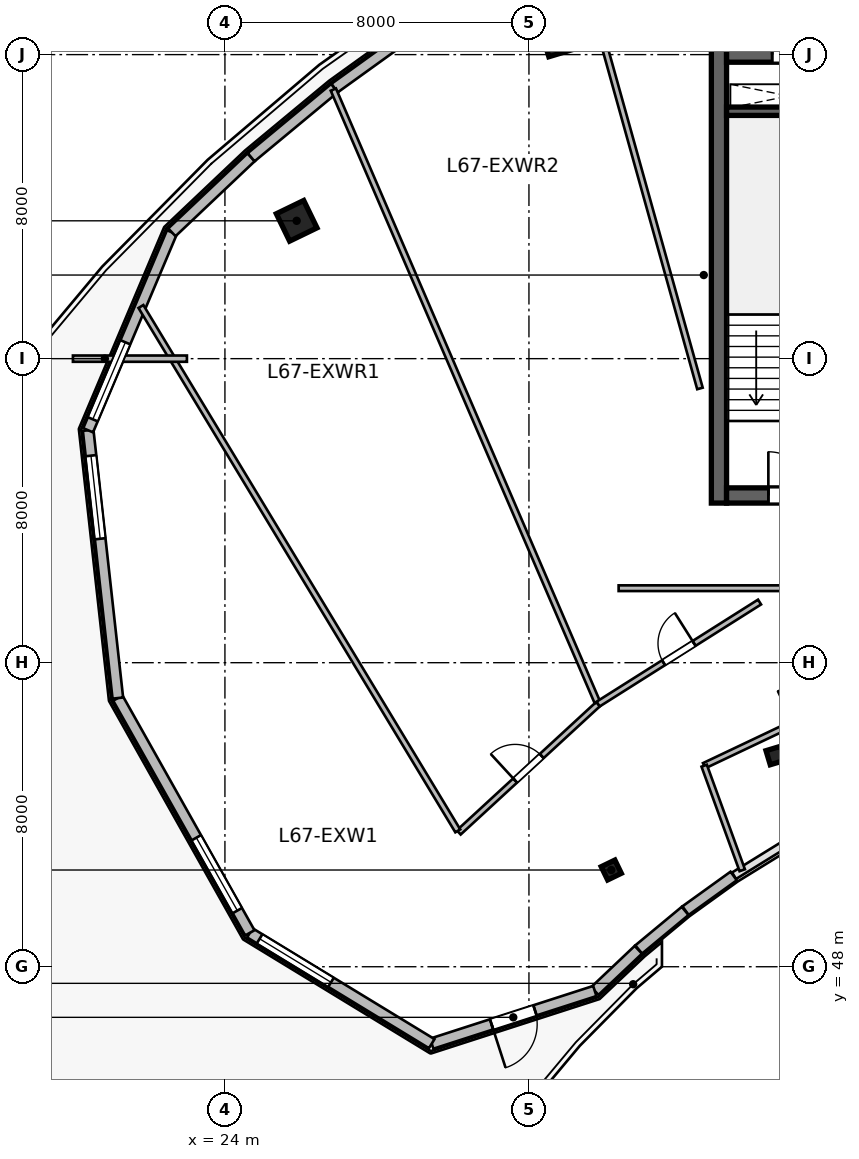
"""IFC4 building model, lengths in metres.
Left out: names, types, materials, properties, quantities, classifications, styles, units other than length and angle.
Written with IfcOpenShell. Run it as: python <this file> out.ifc"""

import sys

from ifc_helpers import new_model, si_unit, direction, frame, frame_2d, origin, origin_2d, place, context, subcontext, project, spatial, rectangle, i_section, extrude, source, transform, mapped, element, fill, save


model = new_model("IFC4")
c1 = context("Model", 3, precision=1e-05, world=origin(), true_north=direction((0.0, 1.0)))
c2 = subcontext(c1, "Body", "Model", "MODEL_VIEW")
j1 = project(units=[si_unit("LENGTHUNIT", "METRE"), si_unit("PLANEANGLEUNIT", "RADIAN")], contexts=[c1])
p1 = place(None, origin())
s1 = spatial("IfcSite", under=j1, at=p1, CompositionType="ELEMENT")
p2 = place(p1, origin())
s2 = spatial("IfcBuilding", under=s1, at=p2, CompositionType="ELEMENT")
p3 = place(p2, frame((0.0, 0.0, 275.7)))
s3 = spatial("IfcBuildingStorey", under=s2, at=p3, CompositionType="ELEMENT", Elevation=275.7)
m1 = source(origin(), c2, "Body", "SweptSolid", [
    extrude(rectangle(XDim=12.0, YDim=0.4, at=frame_2d((6.0, 0.0))), origin(), (0.0, 0.0, 1.0), 3.9),
])
p4 = place(p3, frame((37.0, 60.2, 0.0), z_axis=(0.0, 0.0, 1.0), x_axis=(0.0, 1.0, 0.0)))
e1 = element("IfcWall", 1, at=p4, inside=s3, PredefinedType="SHEAR", context=c2, shape_type="MappedRepresentation", body=[
    mapped(m1, transform((0.0, 0.0, 0.0), scale=1.0)),
])
m2 = source(origin(), c2, "Body", "SweptSolid", [
    extrude(rectangle(XDim=21.6, YDim=0.4, at=frame_2d((10.8, 0.0))), origin(), (0.0, 0.0, 1.0), 3.9),
])
p5 = place(p3, frame((37.2, 60.4, 0.0), z_axis=(0.0, 0.0, 1.0), x_axis=(1.0, 0.0, 0.0)))
e2 = element("IfcWall", 2, at=p5, inside=s3, PredefinedType="SHEAR", context=c2, shape_type="MappedRepresentation", body=[
    mapped(m2, transform((0.0, 0.0, 0.0), scale=1.0)),
])
p6 = place(p5, frame((1.1, 0.0, 0.0)))
e3 = element("IfcOpeningElement", 3, at=p6, cuts=e2, PredefinedType="OPENING", context=c2, shape_type="SweptSolid", body=[
    extrude(rectangle(XDim=1.15, YDim=2.15, at=frame_2d((0.575, 1.075))), frame((0.0, 0.21, 0.0), z_axis=(0.0, -1.0, 0.0), x_axis=(1.0, 0.0, 0.0)), (0.0, 0.0, 1.0), 0.42),
])
p7 = place(p5, frame((19.5, 0.0, 0.0)))
e4 = element("IfcOpeningElement", 4, at=p7, cuts=e2, PredefinedType="OPENING", context=c2, shape_type="SweptSolid", body=[
    extrude(rectangle(XDim=0.9, YDim=2.1, at=frame_2d((0.45, 1.05))), frame((0.0, 0.21, 0.0), z_axis=(0.0, -1.0, 0.0), x_axis=(1.0, 0.0, 0.0)), (0.0, 0.0, 1.0), 0.42),
])
p8 = place(p5, frame((12.02, 0.0, 0.0)))
e5 = element("IfcOpeningElement", 5, at=p8, cuts=e2, PredefinedType="OPENING", context=c2, shape_type="SweptSolid", body=[
    extrude(rectangle(XDim=1.6, YDim=2.15, at=frame_2d((0.8, 1.075))), frame((0.0, 0.21, 0.0), z_axis=(0.0, -1.0, 0.0), x_axis=(1.0, 0.0, 0.0)), (0.0, 0.0, 1.0), 0.42),
])
p9 = place(p3, frame((37.2, 72.0, 0.0), z_axis=(0.0, 0.0, 1.0), x_axis=(1.0, 0.0, 0.0)))
e6 = element("IfcWall", 6, at=p9, inside=s3, PredefinedType="SHEAR", context=c2, shape_type="MappedRepresentation", body=[
    mapped(m2, transform((0.0, 0.0, 0.0), scale=1.0)),
])
p10 = place(p9, frame((1.2, 0.0, 0.0)))
e7 = element("IfcOpeningElement", 7, at=p10, cuts=e6, PredefinedType="OPENING", context=c2, shape_type="SweptSolid", body=[
    extrude(rectangle(XDim=0.9, YDim=2.1, at=frame_2d((0.45, 1.05))), frame((0.0, 0.21, 0.0), z_axis=(0.0, -1.0, 0.0), x_axis=(1.0, 0.0, 0.0)), (0.0, 0.0, 1.0), 0.42),
])
p11 = place(p9, frame((14.7, 0.0, 0.0)))
e8 = element("IfcOpeningElement", 8, at=p11, cuts=e6, PredefinedType="OPENING", context=c2, shape_type="SweptSolid", body=[
    extrude(rectangle(XDim=1.2, YDim=2.15, at=frame_2d((0.6, 1.075))), frame((0.0, 0.21, 0.0), z_axis=(0.0, -1.0, 0.0), x_axis=(1.0, 0.0, 0.0)), (0.0, 0.0, 1.0), 0.42),
])
p12 = place(p9, frame((4.15, 0.0, 0.0)))
e9 = element("IfcOpeningElement", 9, at=p12, cuts=e6, PredefinedType="OPENING", context=c2, shape_type="SweptSolid", body=[
    extrude(rectangle(XDim=1.3, YDim=2.15, at=frame_2d((0.65, 1.075))), frame((0.0, 0.21, 0.0), z_axis=(0.0, -1.0, 0.0), x_axis=(1.0, 0.0, 0.0)), (0.0, 0.0, 1.0), 0.42),
])
p13 = place(p9, frame((6.76, 0.0, 0.0)))
e10 = element("IfcOpeningElement", 10, at=p13, cuts=e6, PredefinedType="OPENING", context=c2, shape_type="SweptSolid", body=[
    extrude(rectangle(XDim=0.85, YDim=2.1, at=frame_2d((0.425, 1.05))), frame((0.0, 0.21, 0.0), z_axis=(0.0, -1.0, 0.0), x_axis=(1.0, 0.0, 0.0)), (0.0, 0.0, 1.0), 0.42),
])
p14 = place(p9, frame((8.76, 0.0, 0.0)))
e11 = element("IfcOpeningElement", 11, at=p14, cuts=e6, PredefinedType="OPENING", context=c2, shape_type="SweptSolid", body=[
    extrude(rectangle(XDim=0.85, YDim=2.1, at=frame_2d((0.425, 1.05))), frame((0.0, 0.21, 0.0), z_axis=(0.0, -1.0, 0.0), x_axis=(1.0, 0.0, 0.0)), (0.0, 0.0, 1.0), 0.42),
])
p15 = place(p9, frame((10.725, 0.0, 0.0)))
e12 = element("IfcOpeningElement", 12, at=p15, cuts=e6, PredefinedType="OPENING", context=c2, shape_type="SweptSolid", body=[
    extrude(rectangle(XDim=0.85, YDim=2.1, at=frame_2d((0.425, 1.05))), frame((0.0, 0.21, 0.0), z_axis=(0.0, -1.0, 0.0), x_axis=(1.0, 0.0, 0.0)), (0.0, 0.0, 1.0), 0.42),
])
m3 = source(origin(), c2, "Body", "SweptSolid", [
    extrude(rectangle(XDim=3.27, YDim=0.22, at=frame_2d((1.635, 0.0))), origin(), (0.0, 0.0, 1.0), 3.9),
])
p16 = place(p3, frame((37.2, 70.51, 0.0), z_axis=(0.0, 0.0, 1.0), x_axis=(1.0, 0.0, 0.0)))
e13 = element("IfcWall", 13, at=p16, inside=s3, PredefinedType="SHEAR", context=c2, shape_type="MappedRepresentation", body=[
    mapped(m3, transform((0.0, 0.0, 0.0), scale=1.0)),
])
m4 = source(origin(), c2, "Body", "SweptSolid", [
    extrude(i_section(OverallWidth=0.399, OverallDepth=0.387, WebThickness=0.021, FlangeThickness=0.033, at=origin_2d()), origin(), (0.0, 0.0, 1.0), 3.9),
])
p17 = place(p3, frame((34.166, 50.545, 0.0), z_axis=(0.0, 0.0, 1.0), x_axis=(-0.436173672171, 0.899862504889, 0.0)))
e14 = element("IfcColumn", 14, at=p17, inside=s3, PredefinedType="COLUMN", context=c2, shape_type="MappedRepresentation", body=[
    mapped(m4, transform((0.0, 0.0, 0.0), scale=1.0)),
])
m5 = source(origin(), c2, "Body", "SweptSolid", [
    extrude(rectangle(XDim=0.8, YDim=0.8, at=origin_2d()), origin(), (0.0, 0.0, 1.0), 3.9),
])
p18 = place(p3, frame((25.888, 67.627, 0.0), z_axis=(0.0, 0.0, 1.0), x_axis=(-0.436173672171, 0.899862504889, 0.0)))
e15 = element("IfcColumn", 15, at=p18, inside=s3, PredefinedType="COLUMN", context=c2, shape_type="MappedRepresentation", body=[
    mapped(m5, transform((0.0, 0.0, 0.0), scale=1.0)),
])
p19 = place(p3, frame((38.485, 53.558, 0.0), z_axis=(0.0, 0.0, 1.0), x_axis=(-0.288697611798, 0.957420330337, 0.0)))
e16 = element("IfcColumn", 16, at=p19, inside=s3, PredefinedType="COLUMN", context=c2, shape_type="MappedRepresentation", body=[
    mapped(m4, transform((0.0, 0.0, 0.0), scale=1.0)),
])
p20 = place(p3, frame((32.791, 72.442, 0.0), z_axis=(0.0, 0.0, 1.0), x_axis=(-0.288697611798, 0.957420330337, 0.0)))
e17 = element("IfcColumn", 17, at=p20, inside=s3, PredefinedType="COLUMN", context=c2, shape_type="MappedRepresentation", body=[
    mapped(m5, transform((0.0, 0.0, 0.0), scale=1.0)),
])
m6 = source(origin(), c2, "Body", "SweptSolid", [
    extrude(rectangle(XDim=1.561, YDim=0.28, at=frame_2d((0.781, 0.0))), origin(), (0.0, 0.0, 1.0), 3.64),
])
p21 = place(p3, frame((37.387, 50.387, 0.0), z_axis=(0.0, 0.0, 1.0), x_axis=(-0.81154027425, -0.584296485758, 0.0)))
e18 = element("IfcWall", 18, at=p21, inside=s3, PredefinedType="SOLIDWALL", context=c2, shape_type="MappedRepresentation", body=[
    mapped(m6, transform((0.0, 0.0, 0.0), scale=1.0)),
])
m7 = source(origin(), c2, "Body", "SweptSolid", [
    extrude(rectangle(XDim=1.589, YDim=0.28, at=frame_2d((0.794, 0.0))), origin(), (0.0, 0.0, 1.0), 3.64),
])
p22 = place(p3, frame((36.11, 49.468, 0.0), z_axis=(0.0, 0.0, 1.0), x_axis=(-0.769805836273, -0.63827813251, 0.0)))
e19 = element("IfcWall", 19, at=p22, inside=s3, PredefinedType="SOLIDWALL", context=c2, shape_type="MappedRepresentation", body=[
    mapped(m7, transform((0.0, 0.0, 0.0), scale=1.0)),
])
m8 = source(origin(), c2, "Body", "SweptSolid", [
    extrude(rectangle(XDim=1.577, YDim=0.28, at=frame_2d((0.789, 0.0))), origin(), (0.0, 0.0, 1.0), 3.64),
])
p23 = place(p3, frame((34.878, 48.446, 0.0), z_axis=(0.0, 0.0, 1.0), x_axis=(-0.726119464467, -0.687568558998, 0.0)))
e20 = element("IfcWall", 20, at=p23, inside=s3, PredefinedType="SOLIDWALL", context=c2, shape_type="MappedRepresentation", body=[
    mapped(m8, transform((0.0, 0.0, 0.0), scale=1.0)),
])
m9 = source(origin(), c2, "Body", "SweptSolid", [
    extrude(rectangle(XDim=4.509, YDim=0.28, at=frame_2d((2.255, 0.0))), origin(), (0.0, 0.0, 1.0), 3.64),
])
p24 = place(p3, frame((33.733, 47.361, 0.0), z_axis=(0.0, 0.0, 1.0), x_axis=(-0.95162949292, -0.307247958828, 0.0)))
e21 = element("IfcWall", 21, at=p24, inside=s3, PredefinedType="SOLIDWALL", context=c2, shape_type="MappedRepresentation", body=[
    mapped(m9, transform((0.0, 0.0, 0.0), scale=1.0)),
])
p25 = place(p24, frame((1.655, 0.0, 0.0)))
e22 = element("IfcOpeningElement", 22, at=p25, cuts=e21, PredefinedType="OPENING", context=c2, shape_type="SweptSolid", body=[
    extrude(rectangle(XDim=1.2, YDim=2.2, at=frame_2d((0.6, 1.1))), frame((0.0, 0.15, 0.0), z_axis=(0.0, -1.0, 0.0), x_axis=(1.0, 0.0, 0.0)), (0.0, 0.0, 1.0), 0.3),
])
m10 = source(origin(), c2, "Body", "SweptSolid", [
    extrude(rectangle(XDim=5.604, YDim=0.28, at=frame_2d((2.802, 0.0))), origin(), (0.0, 0.0, 1.0), 3.64),
])
p26 = place(p3, frame((29.442, 45.976, 0.0), z_axis=(0.0, 0.0, 1.0), x_axis=(-0.854002492971, 0.520268913158, 0.0)))
e23 = element("IfcWall", 23, at=p26, inside=s3, PredefinedType="SOLIDWALL", context=c2, shape_type="MappedRepresentation", body=[
    mapped(m10, transform((0.0, 0.0, 0.0), scale=1.0)),
])
p27 = place(p26, frame((3.103, 0.0, 0.95)))
e24 = element("IfcOpeningElement", 24, at=p27, cuts=e23, PredefinedType="OPENING", context=c2, shape_type="SweptSolid", body=[
    extrude(rectangle(XDim=2.2, YDim=2.1, at=frame_2d((1.1, 1.05))), frame((0.0, 0.15, 0.0), z_axis=(0.0, -1.0, 0.0), x_axis=(1.0, 0.0, 0.0)), (0.0, 0.0, 1.0), 0.3),
])
m11 = source(origin(), c2, "Body", "SweptSolid", [
    extrude(rectangle(XDim=7.087, YDim=0.28, at=frame_2d((3.543, 0.0))), origin(), (0.0, 0.0, 1.0), 3.64),
])
p28 = place(p3, frame((24.656, 48.892, 0.0), z_axis=(0.0, 0.0, 1.0), x_axis=(-0.490158199368, 0.871633489256, 0.0)))
e25 = element("IfcWall", 25, at=p28, inside=s3, PredefinedType="SOLIDWALL", context=c2, shape_type="MappedRepresentation", body=[
    mapped(m11, transform((0.0, 0.0, 0.0), scale=1.0)),
])
p29 = place(p28, frame((0.672, 0.0, 0.95)))
e26 = element("IfcOpeningElement", 26, at=p29, cuts=e25, PredefinedType="OPENING", context=c2, shape_type="SweptSolid", body=[
    extrude(rectangle(XDim=2.2, YDim=2.1, at=frame_2d((1.1, 1.05))), frame((0.0, 0.15, 0.0), z_axis=(0.0, -1.0, 0.0), x_axis=(1.0, 0.0, 0.0)), (0.0, 0.0, 1.0), 0.3),
])
m12 = source(origin(), c2, "Body", "SweptSolid", [
    extrude(rectangle(XDim=7.09, YDim=0.28, at=frame_2d((3.545, 0.0))), origin(), (0.0, 0.0, 1.0), 3.64),
])
p30 = place(p3, frame((21.182, 55.069, 0.0), z_axis=(0.0, 0.0, 1.0), x_axis=(-0.110159396922, 0.993913933532, 0.0)))
e27 = element("IfcWall", 27, at=p30, inside=s3, PredefinedType="SOLIDWALL", context=c2, shape_type="MappedRepresentation", body=[
    mapped(m12, transform((0.0, 0.0, 0.0), scale=1.0)),
])
p31 = place(p30, frame((4.217, 0.0, 0.95)))
e28 = element("IfcOpeningElement", 28, at=p31, cuts=e27, PredefinedType="OPENING", context=c2, shape_type="SweptSolid", body=[
    extrude(rectangle(XDim=2.2, YDim=2.1, at=frame_2d((1.1, 1.05))), frame((0.0, 0.15, 0.0), z_axis=(0.0, -1.0, 0.0), x_axis=(1.0, 0.0, 0.0)), (0.0, 0.0, 1.0), 0.3),
])
m13 = source(origin(), c2, "Body", "SweptSolid", [
    extrude(rectangle(XDim=5.655, YDim=0.28, at=frame_2d((2.828, 0.0))), origin(), (0.0, 0.0, 1.0), 3.64),
])
p32 = place(p3, frame((20.401, 62.116, 0.0), z_axis=(0.0, 0.0, 1.0), x_axis=(0.389585063528, 0.920990487614, 0.0)))
e29 = element("IfcWall", 29, at=p32, inside=s3, PredefinedType="SOLIDWALL", context=c2, shape_type="MappedRepresentation", body=[
    mapped(m13, transform((0.0, 0.0, 0.0), scale=1.0)),
])
p33 = place(p32, frame((0.314, 0.0, 0.95)))
e30 = element("IfcOpeningElement", 30, at=p33, cuts=e29, PredefinedType="OPENING", context=c2, shape_type="SweptSolid", body=[
    extrude(rectangle(XDim=2.2, YDim=2.1, at=frame_2d((1.1, 1.05))), frame((0.0, 0.15, 0.0), z_axis=(0.0, -1.0, 0.0), x_axis=(1.0, 0.0, 0.0)), (0.0, 0.0, 1.0), 0.3),
])
m14 = source(origin(), c2, "Body", "SweptSolid", [
    extrude(rectangle(XDim=2.873, YDim=0.28, at=frame_2d((1.436, 0.0))), origin(), (0.0, 0.0, 1.0), 3.64),
])
p34 = place(p3, frame((22.604, 67.324, 0.0), z_axis=(0.0, 0.0, 1.0), x_axis=(0.72609560544, 0.687593754888, 0.0)))
e31 = element("IfcWall", 31, at=p34, inside=s3, PredefinedType="SOLIDWALL", context=c2, shape_type="MappedRepresentation", body=[
    mapped(m14, transform((0.0, 0.0, 0.0), scale=1.0)),
])
m15 = source(origin(), c2, "Body", "SweptSolid", [
    extrude(rectangle(XDim=2.852, YDim=0.28, at=frame_2d((1.426, 0.0))), origin(), (0.0, 0.0, 1.0), 3.64),
])
p35 = place(p3, frame((24.69, 69.299, 0.0), z_axis=(0.0, 0.0, 1.0), x_axis=(0.769783606009, 0.638304942735, 0.0)))
e32 = element("IfcWall", 32, at=p35, inside=s3, PredefinedType="SOLIDWALL", context=c2, shape_type="MappedRepresentation", body=[
    mapped(m15, transform((0.0, 0.0, 0.0), scale=1.0)),
])
m16 = source(origin(), c2, "Body", "SweptSolid", [
    extrude(rectangle(XDim=2.802, YDim=0.28, at=frame_2d((1.401, 0.0))), origin(), (0.0, 0.0, 1.0), 3.64),
])
p36 = place(p3, frame((26.885, 71.12, 0.0), z_axis=(0.0, 0.0, 1.0), x_axis=(0.811507896482, 0.584341453217, 0.0)))
e33 = element("IfcWall", 33, at=p36, inside=s3, PredefinedType="SOLIDWALL", context=c2, shape_type="MappedRepresentation", body=[
    mapped(m16, transform((0.0, 0.0, 0.0), scale=1.0)),
])
m17 = source(origin(), c2, "Body", "SweptSolid", [
    extrude(rectangle(XDim=6.137, YDim=0.15, at=frame_2d((3.069, 0.0))), origin(), (0.0, 0.0, 1.0), 3.64),
])
p37 = place(p3, frame((36.611, 53.29, 0.0), z_axis=(0.0, 0.0, 1.0), x_axis=(0.903442784804, 0.428708682657, 0.0)))
e34 = element("IfcWall", 34, at=p37, inside=s3, PredefinedType="PARTITIONING", context=c2, shape_type="MappedRepresentation", body=[
    mapped(m17, transform((0.0, 0.0, 0.0), scale=1.0)),
])
p38 = place(p37, frame((2.594, 0.0, 0.0)))
e35 = element("IfcOpeningElement", 35, at=p38, cuts=e34, PredefinedType="OPENING", context=c2, shape_type="SweptSolid", body=[
    extrude(rectangle(XDim=0.95, YDim=2.1, at=frame_2d((0.475, 1.05))), frame((0.0, 0.085, 0.0), z_axis=(0.0, -1.0, 0.0), x_axis=(1.0, 0.0, 0.0)), (0.0, 0.0, 1.0), 0.17),
])
m18 = source(origin(), c2, "Body", "SweptSolid", [
    extrude(rectangle(XDim=2.927, YDim=0.15, at=frame_2d((1.464, 0.0))), origin(), (0.0, 0.0, 1.0), 3.64),
])
p39 = place(p3, frame((37.612, 50.539, 0.0), z_axis=(0.0, 0.0, 1.0), x_axis=(-0.342030996507, 0.93968867048, 0.0)))
e36 = element("IfcWall", 36, at=p39, inside=s3, PredefinedType="PARTITIONING", context=c2, shape_type="MappedRepresentation", body=[
    mapped(m18, transform((0.0, 0.0, 0.0), scale=1.0)),
])
m19 = source(origin(), c2, "Body", "SweptSolid", [
    extrude(rectangle(XDim=4.986, YDim=0.15, at=frame_2d((2.493, 0.0))), origin(), (0.0, 0.0, 1.0), 3.64),
])
p40 = place(p3, frame((30.153, 51.533, 0.0), z_axis=(0.0, 0.0, 1.0), x_axis=(0.735595190169, 0.677421372707, 0.0)))
e37 = element("IfcWall", 37, at=p40, inside=s3, PredefinedType="PARTITIONING", context=c2, shape_type="MappedRepresentation", body=[
    mapped(m19, transform((0.0, 0.0, 0.0), scale=1.0)),
])
p41 = place(p40, frame((2.018, 0.0, 0.0)))
e38 = element("IfcOpeningElement", 38, at=p41, cuts=e37, PredefinedType="OPENING", context=c2, shape_type="SweptSolid", body=[
    extrude(rectangle(XDim=0.95, YDim=2.1, at=frame_2d((0.475, 1.05))), frame((0.0, 0.085, 0.0), z_axis=(0.0, -1.0, 0.0), x_axis=(1.0, 0.0, 0.0)), (0.0, 0.0, 1.0), 0.17),
])
m20 = source(origin(), c2, "Body", "SweptSolid", [
    extrude(rectangle(XDim=16.121, YDim=0.15, at=frame_2d((8.061, 0.0))), origin(), (0.0, 0.0, 1.0), 3.64),
])
p42 = place(p3, frame((30.127, 51.575, 0.0), z_axis=(0.0, 0.0, 1.0), x_axis=(-0.517212483904, 0.855857024563, 0.0)))
e39 = element("IfcWall", 39, at=p42, inside=s3, PredefinedType="PARTITIONING", context=c2, shape_type="MappedRepresentation", body=[
    mapped(m20, transform((0.0, 0.0, 0.0), scale=1.0)),
])
m21 = source(origin(), c2, "Body", "SweptSolid", [
    extrude(rectangle(XDim=17.556, YDim=0.15, at=frame_2d((8.778, 0.0))), origin(), (0.0, 0.0, 1.0), 3.64),
])
p43 = place(p3, frame((33.8, 54.958, 0.0), z_axis=(0.0, 0.0, 1.0), x_axis=(-0.395687598313, 0.918385172213, 0.0)))
e40 = element("IfcWall", 40, at=p43, inside=s3, PredefinedType="PARTITIONING", context=c2, shape_type="MappedRepresentation", body=[
    mapped(m21, transform((0.0, 0.0, 0.0), scale=1.0)),
])
m22 = source(origin(), c2, "Body", "SweptSolid", [
    extrude(rectangle(XDim=5.025, YDim=0.15, at=frame_2d((2.513, 0.0))), origin(), (0.0, 0.0, 1.0), 3.64),
])
p44 = place(p3, frame((33.82, 54.911, 0.0), z_axis=(0.0, 0.0, 1.0), x_axis=(0.84532378062, 0.534254345717, 0.0)))
e41 = element("IfcWall", 41, at=p44, inside=s3, PredefinedType="PARTITIONING", context=c2, shape_type="MappedRepresentation", body=[
    mapped(m22, transform((0.0, 0.0, 0.0), scale=1.0)),
])
p45 = place(p44, frame((2.038, 0.0, 0.0)))
e42 = element("IfcOpeningElement", 42, at=p45, cuts=e41, PredefinedType="OPENING", context=c2, shape_type="SweptSolid", body=[
    extrude(rectangle(XDim=0.95, YDim=2.1, at=frame_2d((0.475, 1.05))), frame((0.0, 0.085, 0.0), z_axis=(0.0, -1.0, 0.0), x_axis=(1.0, 0.0, 0.0)), (0.0, 0.0, 1.0), 0.17),
])
m23 = source(origin(), c2, "Body", "SweptSolid", [
    extrude(rectangle(XDim=12.311, YDim=0.15, at=frame_2d((6.155, 0.0))), origin(), (0.0, 0.0, 1.0), 3.64),
])
p46 = place(p3, frame((36.5, 63.216, 0.0), z_axis=(0.0, 0.0, 1.0), x_axis=(-0.268759602651, 0.963207286093, 0.0)))
e43 = element("IfcWall", 43, at=p46, inside=s3, PredefinedType="PARTITIONING", context=c2, shape_type="MappedRepresentation", body=[
    mapped(m23, transform((0.0, 0.0, 0.0), scale=1.0)),
])
m24 = source(origin(), c2, "Body", "SweptSolid", [
    extrude(rectangle(XDim=12.39, YDim=0.15, at=frame_2d((6.195, 0.0))), origin(), (0.0, 0.0, 1.0), 3.27),
])
p47 = place(p3, frame((34.36, 57.96, 0.0), z_axis=(0.0, 0.0, 1.0), x_axis=(1.0, 0.0, 0.0)))
e44 = element("IfcWall", 44, at=p47, inside=s3, PredefinedType="PARTITIONING", context=c2, shape_type="MappedRepresentation", body=[
    mapped(m24, transform((0.0, 0.0, 0.0), scale=1.0)),
])
m25 = source(origin(), c2, "Body", "SweptSolid", [
    extrude(rectangle(XDim=3.0, YDim=0.165, at=frame_2d((1.5, 0.0))), origin(), (0.0, 0.0, 1.0), 0.65),
])
p48 = place(p3, frame((20.0, 64.0, 0.0), z_axis=(0.0, 0.0, 1.0), x_axis=(1.0, 0.0, 0.0)))
e45 = element("IfcWall", 45, at=p48, inside=s3, PredefinedType="PARAPET", context=c2, shape_type="MappedRepresentation", body=[
    mapped(m25, transform((0.0, 0.0, 0.0), scale=1.0)),
])
m26 = source(origin(), c2, "Body", "SweptSolid", [
    extrude(rectangle(XDim=1.2, YDim=2.2, at=frame_2d((0.6, 1.1))), frame((0.0, 0.025, 0.0), z_axis=(0.0, -1.0, 0.0), x_axis=(1.0, 0.0, 0.0)), (0.0, 0.0, 1.0), 0.05),
])
p49 = place(p25, origin())
e46 = element("IfcDoor", 46, at=p49, inside=s3, OperationType="SINGLE_SWING_RIGHT", PredefinedType="DOOR", context=c2, shape_type="MappedRepresentation", body=[
    mapped(m26, transform((0.0, 0.0, 0.0), scale=1.0)),
])
fill(e22, e46)
m27 = source(origin(), c2, "Body", "SweptSolid", [
    extrude(rectangle(XDim=2.2, YDim=2.1, at=frame_2d((1.1, 1.05))), frame((0.0, 0.03, 0.0), z_axis=(0.0, -1.0, 0.0), x_axis=(1.0, 0.0, 0.0)), (0.0, 0.0, 1.0), 0.06),
])
p50 = place(p27, origin())
e47 = element("IfcWindow", 47, at=p50, inside=s3, PartitioningType="TRIPLE_PANEL_VERTICAL", PredefinedType="WINDOW", context=c2, shape_type="MappedRepresentation", body=[
    mapped(m27, transform((0.0, 0.0, 0.0), scale=1.0)),
])
fill(e24, e47)
p51 = place(p29, origin())
e48 = element("IfcWindow", 48, at=p51, inside=s3, PartitioningType="TRIPLE_PANEL_VERTICAL", PredefinedType="WINDOW", context=c2, shape_type="MappedRepresentation", body=[
    mapped(m27, transform((0.0, 0.0, 0.0), scale=1.0)),
])
fill(e26, e48)
p52 = place(p31, origin())
e49 = element("IfcWindow", 49, at=p52, inside=s3, PartitioningType="TRIPLE_PANEL_VERTICAL", PredefinedType="WINDOW", context=c2, shape_type="MappedRepresentation", body=[
    mapped(m27, transform((0.0, 0.0, 0.0), scale=1.0)),
])
fill(e28, e49)
p53 = place(p33, origin())
e50 = element("IfcWindow", 50, at=p53, inside=s3, PartitioningType="TRIPLE_PANEL_VERTICAL", PredefinedType="WINDOW", context=c2, shape_type="MappedRepresentation", body=[
    mapped(m27, transform((0.0, 0.0, 0.0), scale=1.0)),
])
fill(e30, e50)
m28 = source(origin(), c2, "Body", "SweptSolid", [
    extrude(rectangle(XDim=1.15, YDim=2.15, at=frame_2d((0.575, 1.075))), frame((0.0, 0.025, 0.0), z_axis=(0.0, -1.0, 0.0), x_axis=(1.0, 0.0, 0.0)), (0.0, 0.0, 1.0), 0.05),
])
p54 = place(p6, origin())
e51 = element("IfcDoor", 51, at=p54, inside=s3, OperationType="SINGLE_SWING_LEFT", PredefinedType="DOOR", context=c2, shape_type="MappedRepresentation", body=[
    mapped(m28, transform((0.0, 0.0, 0.0), scale=1.0)),
])
fill(e3, e51)
m29 = source(origin(), c2, "Body", "SweptSolid", [
    extrude(rectangle(XDim=0.9, YDim=2.1, at=frame_2d((0.45, 1.05))), frame((0.0, 0.025, 0.0), z_axis=(0.0, -1.0, 0.0), x_axis=(1.0, 0.0, 0.0)), (0.0, 0.0, 1.0), 0.05),
])
p55 = place(p10, origin())
e52 = element("IfcDoor", 52, at=p55, inside=s3, OperationType="SINGLE_SWING_LEFT", PredefinedType="DOOR", context=c2, shape_type="MappedRepresentation", body=[
    mapped(m29, transform((0.0, 0.0, 0.0), scale=1.0)),
])
fill(e7, e52)
m30 = source(origin(), c2, "Body", "SweptSolid", [
    extrude(rectangle(XDim=0.95, YDim=2.1, at=frame_2d((0.475, 1.05))), frame((0.0, 0.025, 0.0), z_axis=(0.0, -1.0, 0.0), x_axis=(1.0, 0.0, 0.0)), (0.0, 0.0, 1.0), 0.05),
])
p56 = place(p41, origin())
e53 = element("IfcDoor", 53, at=p56, inside=s3, OperationType="SINGLE_SWING_LEFT", PredefinedType="DOOR", context=c2, shape_type="MappedRepresentation", body=[
    mapped(m30, transform((0.0, 0.0, 0.0), scale=1.0)),
])
fill(e38, e53)
p57 = place(p45, origin())
e54 = element("IfcDoor", 54, at=p57, inside=s3, OperationType="SINGLE_SWING_RIGHT", PredefinedType="DOOR", context=c2, shape_type="MappedRepresentation", body=[
    mapped(m30, transform((0.0, 0.0, 0.0), scale=1.0)),
])
fill(e42, e54)
save(model, sys.argv[1])
